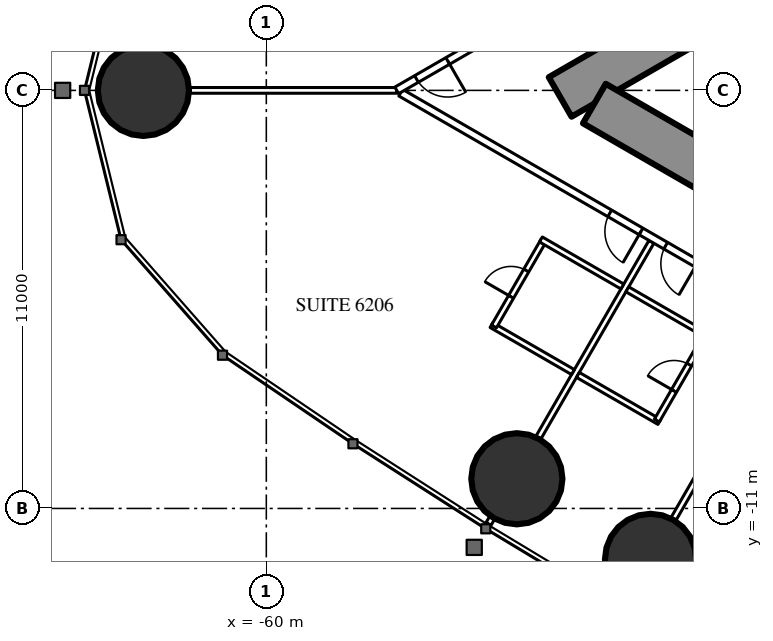
"""IFC4 building model, lengths in metres.
Left out: names, types, materials, properties, quantities, classifications, styles, units other than length and angle.
Written with IfcOpenShell. Run it as: python <this file> out.ifc"""

import sys

from ifc_helpers import new_model, si_unit, direction, frame, frame_2d, origin, origin_2d, place, context, subcontext, project, spatial, rectangle, circle, extrude, element, fill, save


model = new_model("IFC4")
c1 = context("Model", 3, precision=1e-05, world=origin(), true_north=direction((0.0, 1.0)))
c2 = subcontext(c1, "Body", "Model", "MODEL_VIEW")
j1 = project(units=[si_unit("LENGTHUNIT", "METRE"), si_unit("PLANEANGLEUNIT", "RADIAN")], contexts=[c1])
p1 = place(None, origin())
s1 = spatial("IfcSite", under=j1, at=p1, CompositionType="ELEMENT")
p2 = place(p1, origin())
s2 = spatial("IfcBuilding", under=s1, at=p2, CompositionType="ELEMENT")
p3 = place(p2, frame((0.0, 0.0, 233.3)))
s3 = spatial("IfcBuildingStorey", under=s2, at=p3, CompositionType="ELEMENT", Elevation=233.3)
for number, where, z_axis, x_axis in (
    (1, (-63.234, 0.0, 0.0), (0.0, 0.0, 1.0), (1.0, 0.0, 0.0)),
    (2, (-53.408, -10.219, 0.0), (0.0, 0.0, 1.0), (1.0, 0.0, 0.0)),
    (3, (-49.89, -12.34, 0.0), (0.0, 0.0, 1.0), (1.0, 0.0, 0.0)),
):
    element("IfcColumn", number, at=place(p3, frame(where, z_axis=z_axis, x_axis=x_axis)), inside=s3, PredefinedType="COLUMN", context=c2, shape_type="SweptSolid", body=[
        extrude(circle(Radius=1.2, at=origin_2d()), origin(), (0.0, 0.0, 1.0), 3.6),
    ])
p4 = place(p3, frame((-27.2, 14.3, 0.0), z_axis=(0.0, 0.0, 1.0), x_axis=(-0.866026593062, -0.499997940104, 0.0)))
e4 = element("IfcWall", 4, at=p4, inside=s3, PredefinedType="SHEAR", context=c2, shape_type="SweptSolid", body=[
    extrude(rectangle(XDim=28.946, YDim=1.2, at=frame_2d((14.473, 0.0))), origin(), (0.0, 0.0, 1.0), 3.6),
])
p5 = place(p4, frame((4.6, 0.0, 0.0)))
e5 = element("IfcOpeningElement", 5, at=p5, cuts=e4, PredefinedType="OPENING", context=c2, shape_type="SweptSolid", body=[
    extrude(rectangle(XDim=1.0, YDim=2.2, at=frame_2d((0.5, 1.1))), frame((0.0, 0.61, 0.0), z_axis=(0.0, -1.0, 0.0), x_axis=(1.0, 0.0, 0.0)), (0.0, 0.0, 1.0), 1.22),
])
p6 = place(p4, frame((13.395, 0.0, 0.0)))
e6 = element("IfcOpeningElement", 6, at=p6, cuts=e4, PredefinedType="OPENING", context=c2, shape_type="SweptSolid", body=[
    extrude(rectangle(XDim=1.8, YDim=2.2, at=frame_2d((0.9, 1.1))), frame((0.0, 0.61, 0.0), z_axis=(0.0, -1.0, 0.0), x_axis=(1.0, 0.0, 0.0)), (0.0, 0.0, 1.0), 1.22),
])
p7 = place(p3, frame((-27.2, -14.3, 0.0), z_axis=(0.0, 0.0, 1.0), x_axis=(-0.866024021859, 0.500002393557, 0.0)))
e7 = element("IfcWall", 7, at=p7, inside=s3, PredefinedType="SHEAR", context=c2, shape_type="SweptSolid", body=[
    extrude(rectangle(XDim=27.907, YDim=1.2, at=frame_2d((13.954, 0.0))), origin(), (0.0, 0.0, 1.0), 3.6),
])
p8 = place(p7, frame((4.6, 0.0, 0.0)))
e8 = element("IfcOpeningElement", 8, at=p8, cuts=e7, PredefinedType="OPENING", context=c2, shape_type="SweptSolid", body=[
    extrude(rectangle(XDim=1.0, YDim=2.2, at=frame_2d((0.5, 1.1))), frame((0.0, 0.61, 0.0), z_axis=(0.0, -1.0, 0.0), x_axis=(1.0, 0.0, 0.0)), (0.0, 0.0, 1.0), 1.22),
])
p9 = place(p7, frame((13.395, 0.0, 0.0)))
e9 = element("IfcOpeningElement", 9, at=p9, cuts=e7, PredefinedType="OPENING", context=c2, shape_type="SweptSolid", body=[
    extrude(rectangle(XDim=1.8, YDim=2.2, at=frame_2d((0.9, 1.1))), frame((0.0, 0.61, 0.0), z_axis=(0.0, -1.0, 0.0), x_axis=(1.0, 0.0, 0.0)), (0.0, 0.0, 1.0), 1.22),
])
p10 = place(p3, frame((-46.274, -6.059, 0.0), z_axis=(0.0, 0.0, 1.0), x_axis=(-0.500020471368, -0.866013584312, 0.0)))
e10 = element("IfcWall", 10, at=p10, inside=s3, PredefinedType="PARTITIONING", context=c2, shape_type="SweptSolid", body=[
    extrude(rectangle(XDim=6.028, YDim=0.15, at=frame_2d((3.014, 0.0))), origin(), (0.0, 0.0, 1.0), 2.45),
])
p11 = place(p3, frame((-49.866, -3.985, 0.0), z_axis=(0.0, 0.0, 1.0), x_axis=(-0.500000694566, -0.866025002776, 0.0)))
e11 = element("IfcWall", 11, at=p11, inside=s3, PredefinedType="PARTITIONING", context=c2, shape_type="SweptSolid", body=[
    extrude(rectangle(XDim=5.95, YDim=0.15, at=frame_2d((2.975, 0.0))), origin(), (0.0, 0.0, 1.0), 2.45),
])
p12 = place(p3, frame((-54.061, -11.25, 0.0), z_axis=(0.0, 0.0, 1.0), x_axis=(-0.500391173478, -0.865799441849, 0.0)))
e12 = element("IfcWall", 12, at=p12, inside=s3, PredefinedType="PARTITIONING", context=c2, shape_type="SweptSolid", body=[
    extrude(rectangle(XDim=0.179, YDim=0.15, at=frame_2d((0.089, 0.0))), origin(), (0.0, 0.0, 1.0), 2.45),
])
p13 = place(p3, frame((-56.568, 0.0, 0.0), z_axis=(0.0, 0.0, 1.0), x_axis=(-1.0, 0.0, 0.0)))
e13 = element("IfcWall", 13, at=p13, inside=s3, PredefinedType="PARTITIONING", context=c2, shape_type="SweptSolid", body=[
    extrude(rectangle(XDim=5.446, YDim=0.15, at=frame_2d((2.723, 0.0))), origin(), (0.0, 0.0, 1.0), 2.45),
])
p14 = place(p3, frame((-44.715, -6.844, 0.0), z_axis=(0.0, 0.0, 1.0), x_axis=(-0.866025261224, 0.500000246922, 0.0)))
e14 = element("IfcWall", 14, at=p14, inside=s3, PredefinedType="PARTITIONING", context=c2, shape_type="SweptSolid", body=[
    extrude(rectangle(XDim=13.567, YDim=0.2, at=frame_2d((6.783, 0.0))), origin(), (0.0, 0.0, 1.0), 3.35),
])
p15 = place(p14, frame((6.266, 0.0, 0.0)))
e15 = element("IfcOpeningElement", 15, at=p15, cuts=e14, PredefinedType="OPENING", context=c2, shape_type="SweptSolid", body=[
    extrude(rectangle(XDim=0.95, YDim=2.2, at=frame_2d((0.475, 1.1))), frame((0.0, 0.11, 0.0), z_axis=(0.0, -1.0, 0.0), x_axis=(1.0, 0.0, 0.0)), (0.0, 0.0, 1.0), 0.22),
])
p16 = place(p14, frame((4.565, 0.0, 0.0)))
e16 = element("IfcOpeningElement", 16, at=p16, cuts=e14, PredefinedType="OPENING", context=c2, shape_type="SweptSolid", body=[
    extrude(rectangle(XDim=0.95, YDim=2.2, at=frame_2d((0.475, 1.1))), frame((0.0, 0.11, 0.0), z_axis=(0.0, -1.0, 0.0), x_axis=(1.0, 0.0, 0.0)), (0.0, 0.0, 1.0), 0.22),
])
p17 = place(p14, frame((0.5, 0.0, 0.0)))
e17 = element("IfcOpeningElement", 17, at=p17, cuts=e14, PredefinedType="OPENING", context=c2, shape_type="SweptSolid", body=[
    extrude(rectangle(XDim=0.967, YDim=2.2, at=frame_2d((0.483, 1.1))), frame((0.0, 0.11, 0.0), z_axis=(0.0, -1.0, 0.0), x_axis=(1.0, 0.0, 0.0)), (0.0, 0.0, 1.0), 0.22),
])
p18 = place(p3, frame((-51.931, -7.411, 0.0), z_axis=(0.0, 0.0, 1.0), x_axis=(-0.866006523861, 0.500032699561, 0.0)))
e18 = element("IfcWall", 18, at=p18, inside=s3, PredefinedType="PARTITIONING", context=c2, shape_type="SweptSolid", body=[
    extrude(rectangle(XDim=2.475, YDim=0.15, at=frame_2d((1.237, 0.0))), origin(), (0.0, 0.0, 1.0), 3.35),
])
p19 = place(p3, frame((-52.71, -3.96, 0.0), z_axis=(0.0, 0.0, 1.0), x_axis=(-0.500006934395, -0.866021400173, 0.0)))
e19 = element("IfcWall", 19, at=p19, inside=s3, PredefinedType="PARTITIONING", context=c2, shape_type="SweptSolid", body=[
    extrude(rectangle(XDim=2.6, YDim=0.15, at=frame_2d((1.3, 0.0))), origin(), (0.0, 0.0, 1.0), 3.35),
])
p20 = place(p19, frame((0.9, 0.0, 0.0)))
e20 = element("IfcOpeningElement", 20, at=p20, cuts=e19, PredefinedType="OPENING", context=c2, shape_type="SweptSolid", body=[
    extrude(rectangle(XDim=0.8, YDim=2.2, at=frame_2d((0.4, 1.1))), frame((0.0, 0.085, 0.0), z_axis=(0.0, -1.0, 0.0), x_axis=(1.0, 0.0, 0.0)), (0.0, 0.0, 1.0), 0.17),
])
p21 = place(p3, frame((-50.631, -5.16, 0.0), z_axis=(0.0, 0.0, 1.0), x_axis=(-0.86604923931, 0.499958713387, 0.0)))
e21 = element("IfcWall", 21, at=p21, inside=s3, PredefinedType="PARTITIONING", context=c2, shape_type="SweptSolid", body=[
    extrude(rectangle(XDim=2.475, YDim=0.15, at=frame_2d((1.237, 0.0))), origin(), (0.0, 0.0, 1.0), 2.5),
])
p22 = place(p3, frame((-49.658, -8.724, 0.0), z_axis=(0.0, 0.0, 1.0), x_axis=(-0.866031185235, 0.4999899861, 0.0)))
e22 = element("IfcWall", 22, at=p22, inside=s3, PredefinedType="PARTITIONING", context=c2, shape_type="SweptSolid", body=[
    extrude(rectangle(XDim=2.475, YDim=0.15, at=frame_2d((1.238, 0.0))), origin(), (0.0, 0.0, 1.0), 3.35),
])
p23 = place(p3, frame((-48.423, -6.435, 0.0), z_axis=(0.0, 0.0, 1.0), x_axis=(-0.500006934395, -0.866021400173, 0.0)))
e23 = element("IfcWall", 23, at=p23, inside=s3, PredefinedType="PARTITIONING", context=c2, shape_type="SweptSolid", body=[
    extrude(rectangle(XDim=2.6, YDim=0.15, at=frame_2d((1.3, 0.0))), origin(), (0.0, 0.0, 1.0), 3.35),
])
p24 = place(p23, frame((0.9, 0.0, 0.0)))
e24 = element("IfcOpeningElement", 24, at=p24, cuts=e23, PredefinedType="OPENING", context=c2, shape_type="SweptSolid", body=[
    extrude(rectangle(XDim=0.8, YDim=2.2, at=frame_2d((0.4, 1.1))), frame((0.0, 0.085, 0.0), z_axis=(0.0, -1.0, 0.0), x_axis=(1.0, 0.0, 0.0)), (0.0, 0.0, 1.0), 0.17),
])
p25 = place(p3, frame((-48.358, -6.472, 0.0), z_axis=(0.0, 0.0, 1.0), x_axis=(-0.866073894602, 0.499916002032, 0.0)))
e25 = element("IfcWall", 25, at=p25, inside=s3, PredefinedType="PARTITIONING", context=c2, shape_type="SweptSolid", body=[
    extrude(rectangle(XDim=2.475, YDim=0.15, at=frame_2d((1.238, 0.0))), origin(), (0.0, 0.0, 1.0), 2.5),
])
p26 = place(p3, frame((-49.816, 3.898, 0.0), z_axis=(0.0, 0.0, 1.0), x_axis=(-0.866028102716, -0.499995325284, 0.0)))
e26 = element("IfcWall", 26, at=p26, inside=s3, PredefinedType="PARTITIONING", context=c2, shape_type="SweptSolid", body=[
    extrude(rectangle(XDim=7.796, YDim=0.2, at=frame_2d((3.898, 0.0))), origin(), (0.0, 0.0, 1.0), 3.35),
])
p27 = place(p26, frame((6.246, 0.0, 0.0)))
e27 = element("IfcOpeningElement", 27, at=p27, cuts=e26, PredefinedType="OPENING", context=c2, shape_type="SweptSolid", body=[
    extrude(rectangle(XDim=0.95, YDim=2.2, at=frame_2d((0.475, 1.1))), frame((0.0, 0.11, 0.0), z_axis=(0.0, -1.0, 0.0), x_axis=(1.0, 0.0, 0.0)), (0.0, 0.0, 1.0), 0.22),
])
p28 = place(p27, origin())
e28 = element("IfcDoor", 28, at=p28, inside=s3, OperationType="SINGLE_SWING_LEFT", PredefinedType="DOOR", context=c2, shape_type="SweptSolid", body=[
    extrude(rectangle(XDim=0.95, YDim=2.2, at=frame_2d((0.475, 1.1))), frame((0.0, 0.025, 0.0), z_axis=(0.0, -1.0, 0.0), x_axis=(1.0, 0.0, 0.0)), (0.0, 0.0, 1.0), 0.05),
])
fill(e27, e28)
p29 = place(p20, origin())
e29 = element("IfcDoor", 29, at=p29, inside=s3, OperationType="SINGLE_SWING_RIGHT", PredefinedType="DOOR", context=c2, shape_type="SweptSolid", body=[
    extrude(rectangle(XDim=0.8, YDim=2.2, at=frame_2d((0.4, 1.1))), frame((0.0, 0.025, 0.0), z_axis=(0.0, -1.0, 0.0), x_axis=(1.0, 0.0, 0.0)), (0.0, 0.0, 1.0), 0.05),
])
fill(e20, e29)
p30 = place(p15, origin())
e30 = element("IfcDoor", 30, at=p30, inside=s3, OperationType="SINGLE_SWING_LEFT", PredefinedType="DOOR", context=c2, shape_type="SweptSolid", body=[
    extrude(rectangle(XDim=0.95, YDim=2.2, at=frame_2d((0.475, 1.1))), frame((0.0, 0.025, 0.0), z_axis=(0.0, -1.0, 0.0), x_axis=(1.0, 0.0, 0.0)), (0.0, 0.0, 1.0), 0.05),
])
fill(e15, e30)
p31 = place(p24, origin())
e31 = element("IfcDoor", 31, at=p31, inside=s3, OperationType="SINGLE_SWING_RIGHT", PredefinedType="DOOR", context=c2, shape_type="SweptSolid", body=[
    extrude(rectangle(XDim=0.8, YDim=2.2, at=frame_2d((0.4, 1.1))), frame((0.0, 0.025, 0.0), z_axis=(0.0, -1.0, 0.0), x_axis=(1.0, 0.0, 0.0)), (0.0, 0.0, 1.0), 0.05),
])
fill(e24, e31)
p32 = place(p16, origin())
e32 = element("IfcDoor", 32, at=p32, inside=s3, OperationType="SINGLE_SWING_LEFT", PredefinedType="DOOR", context=c2, shape_type="SweptSolid", body=[
    extrude(rectangle(XDim=0.95, YDim=2.2, at=frame_2d((0.475, 1.1))), frame((0.0, 0.025, 0.0), z_axis=(0.0, -1.0, 0.0), x_axis=(1.0, 0.0, 0.0)), (0.0, 0.0, 1.0), 0.05),
])
fill(e16, e32)
save(model, sys.argv[1])
